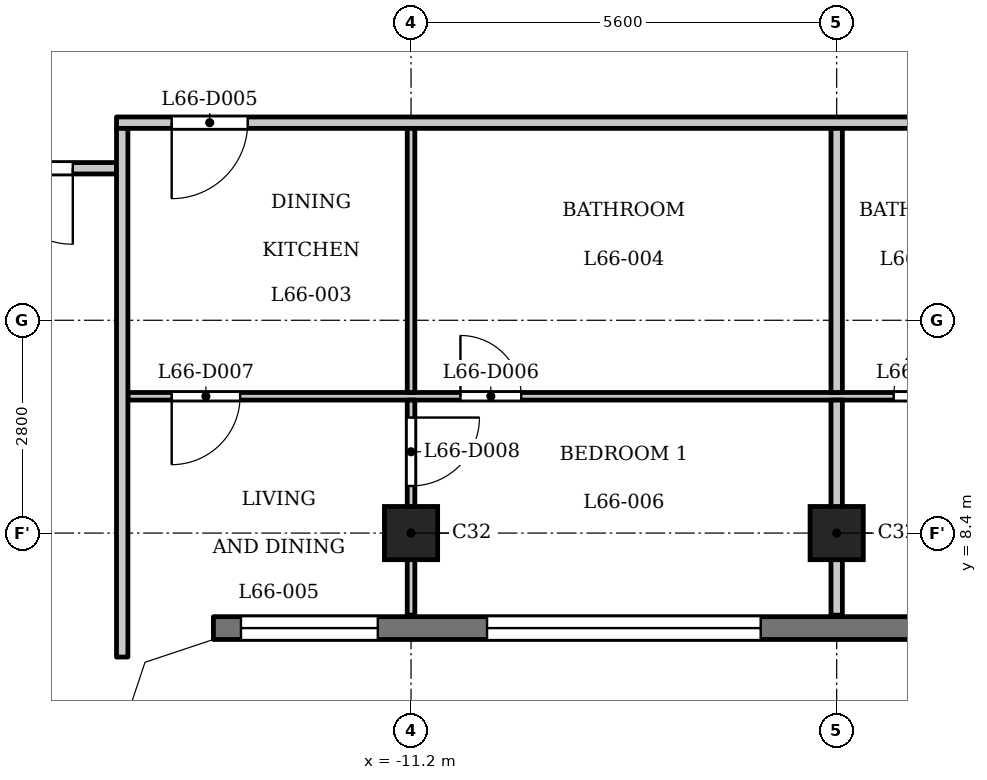
"""IFC4 building model, lengths in metres.
Left out: names, types, materials, properties, quantities, classifications, styles, units other than length and angle.
Written with IfcOpenShell. Run it as: python <this file> out.ifc"""

import sys

from ifc_helpers import new_model, si_unit, direction, frame, frame_2d, origin, origin_2d, place, context, subcontext, project, spatial, polyline, rectangle, outline, extrude, element, fill, save


model = new_model("IFC4")
c1 = context("Model", 3, precision=1e-05, world=origin(), true_north=direction((0.0, 1.0)))
c2 = subcontext(c1, "Body", "Model", "MODEL_VIEW")
j1 = project(units=[si_unit("LENGTHUNIT", "METRE"), si_unit("PLANEANGLEUNIT", "RADIAN")], contexts=[c1])
p1 = place(None, origin())
s1 = spatial("IfcSite", under=j1, at=p1, CompositionType="ELEMENT")
p2 = place(p1, origin())
s2 = spatial("IfcBuilding", under=s1, at=p2, CompositionType="ELEMENT")
p3 = place(p2, frame((0.0, 0.0, 255.7)))
s3 = spatial("IfcBuildingStorey", under=s2, at=p3, CompositionType="ELEMENT", Elevation=255.7)
for number, where, z_axis, x_axis in (
    (1, (-11.2, 8.4, 0.0), (0.0, 0.0, 1.0), (1.0, 0.0, 0.0)),
    (2, (-5.6, 8.4, 0.0), (0.0, 0.0, 1.0), (1.0, 0.0, 0.0)),
):
    element("IfcColumn", number, at=place(p3, frame(where, z_axis=z_axis, x_axis=x_axis)), inside=s3, PredefinedType="COLUMN", context=c2, shape_type="SweptSolid", body=[
        extrude(rectangle(XDim=0.7, YDim=0.7, at=origin_2d()), origin(), (0.0, 0.0, 1.0), 3.5),
    ])
p4 = place(p3, frame((-13.8, 7.15, 0.0), z_axis=(0.0, 0.0, 1.0), x_axis=(1.0, 0.0, 0.0)))
e3 = element("IfcWall", 3, at=p4, inside=s3, PredefinedType="SOLIDWALL", context=c2, shape_type="SweptSolid", body=[
    extrude(rectangle(XDim=27.6, YDim=0.3, at=frame_2d((13.8, 0.0))), origin(), (0.0, 0.0, 1.0), 3.2),
])
p5 = place(p4, frame((0.363, 0.0, 0.9)))
e4 = element("IfcOpeningElement", 4, at=p5, cuts=e3, PredefinedType="OPENING", context=c2, shape_type="SweptSolid", body=[
    extrude(rectangle(XDim=1.8, YDim=1.25, at=frame_2d((0.9, 0.625))), frame((0.0, 0.16, 0.0), z_axis=(0.0, -1.0, 0.0), x_axis=(1.0, 0.0, 0.0)), (0.0, 0.0, 1.0), 0.32),
])
p6 = place(p4, frame((3.6, 0.0, 1.2)))
e5 = element("IfcOpeningElement", 5, at=p6, cuts=e3, PredefinedType="OPENING", context=c2, shape_type="SweptSolid", body=[
    extrude(rectangle(XDim=3.6, YDim=0.95, at=frame_2d((1.8, 0.475))), frame((0.0, 0.16, 0.0), z_axis=(0.0, -1.0, 0.0), x_axis=(1.0, 0.0, 0.0)), (0.0, 0.0, 1.0), 0.32),
])
p7 = place(p4, frame((9.2, 0.0, 1.2)))
e6 = element("IfcOpeningElement", 6, at=p7, cuts=e3, PredefinedType="OPENING", context=c2, shape_type="SweptSolid", body=[
    extrude(rectangle(XDim=3.6, YDim=0.95, at=frame_2d((1.8, 0.475))), frame((0.0, 0.16, 0.0), z_axis=(0.0, -1.0, 0.0), x_axis=(1.0, 0.0, 0.0)), (0.0, 0.0, 1.0), 0.32),
])
p8 = place(p4, frame((14.2, 0.0, 0.9)))
e7 = element("IfcOpeningElement", 7, at=p8, cuts=e3, PredefinedType="OPENING", context=c2, shape_type="SweptSolid", body=[
    extrude(rectangle(XDim=1.8, YDim=1.25, at=frame_2d((0.9, 0.625))), frame((0.0, 0.16, 0.0), z_axis=(0.0, -1.0, 0.0), x_axis=(1.0, 0.0, 0.0)), (0.0, 0.0, 1.0), 0.32),
])
p9 = place(p4, frame((17.0, 0.0, 0.9)))
e8 = element("IfcOpeningElement", 8, at=p9, cuts=e3, PredefinedType="OPENING", context=c2, shape_type="SweptSolid", body=[
    extrude(rectangle(XDim=1.8, YDim=1.25, at=frame_2d((0.9, 0.625))), frame((0.0, 0.16, 0.0), z_axis=(0.0, -1.0, 0.0), x_axis=(1.0, 0.0, 0.0)), (0.0, 0.0, 1.0), 0.32),
])
p10 = place(p4, frame((20.4, 0.0, 1.2)))
e9 = element("IfcOpeningElement", 9, at=p10, cuts=e3, PredefinedType="OPENING", context=c2, shape_type="SweptSolid", body=[
    extrude(rectangle(XDim=3.6, YDim=0.95, at=frame_2d((1.8, 0.475))), frame((0.0, 0.16, 0.0), z_axis=(0.0, -1.0, 0.0), x_axis=(1.0, 0.0, 0.0)), (0.0, 0.0, 1.0), 0.32),
])
p11 = place(p4, frame((25.438, 0.0, 0.9)))
e10 = element("IfcOpeningElement", 10, at=p11, cuts=e3, PredefinedType="OPENING", context=c2, shape_type="SweptSolid", body=[
    extrude(rectangle(XDim=1.8, YDim=1.25, at=frame_2d((0.9, 0.625))), frame((0.0, 0.16, 0.0), z_axis=(0.0, -1.0, 0.0), x_axis=(1.0, 0.0, 0.0)), (0.0, 0.0, 1.0), 0.32),
])
p12 = place(p3, frame((-14.925, 10.2, 0.0), z_axis=(0.0, 0.0, 1.0), x_axis=(1.0, 0.0, 0.0)))
e11 = element("IfcWall", 11, at=p12, inside=s3, PredefinedType="PARTITIONING", context=c2, shape_type="SweptSolid", body=[
    extrude(rectangle(XDim=29.85, YDim=0.1, at=frame_2d((14.925, 0.0))), origin(), (0.0, 0.0, 1.0), 3.2),
])
p13 = place(p12, frame((4.375, 0.0, 0.0)))
e12 = element("IfcOpeningElement", 12, at=p13, cuts=e11, PredefinedType="OPENING", context=c2, shape_type="SweptSolid", body=[
    extrude(rectangle(XDim=0.8, YDim=2.1, at=frame_2d((0.4, 1.05))), frame((0.0, 0.06, 0.0), z_axis=(0.0, -1.0, 0.0), x_axis=(1.0, 0.0, 0.0)), (0.0, 0.0, 1.0), 0.12),
])
p14 = place(p12, frame((0.576, 0.0, 0.0)))
e13 = element("IfcOpeningElement", 13, at=p14, cuts=e11, PredefinedType="OPENING", context=c2, shape_type="SweptSolid", body=[
    extrude(rectangle(XDim=0.9, YDim=2.1, at=frame_2d((0.45, 1.05))), frame((0.0, 0.06, 0.0), z_axis=(0.0, -1.0, 0.0), x_axis=(1.0, 0.0, 0.0)), (0.0, 0.0, 1.0), 0.12),
])
p15 = place(p12, frame((10.075, 0.0, 0.0)))
e14 = element("IfcOpeningElement", 14, at=p15, cuts=e11, PredefinedType="OPENING", context=c2, shape_type="SweptSolid", body=[
    extrude(rectangle(XDim=0.8, YDim=2.1, at=frame_2d((0.4, 1.05))), frame((0.0, 0.06, 0.0), z_axis=(0.0, -1.0, 0.0), x_axis=(1.0, 0.0, 0.0)), (0.0, 0.0, 1.0), 0.12),
])
p16 = place(p12, frame((12.675, 0.0, 0.0)))
e15 = element("IfcOpeningElement", 15, at=p16, cuts=e11, PredefinedType="OPENING", context=c2, shape_type="SweptSolid", body=[
    extrude(rectangle(XDim=0.9, YDim=2.1, at=frame_2d((0.45, 1.05))), frame((0.0, 0.06, 0.0), z_axis=(0.0, -1.0, 0.0), x_axis=(1.0, 0.0, 0.0)), (0.0, 0.0, 1.0), 0.12),
])
p17 = place(p12, frame((16.075, 0.0, 0.0)))
e16 = element("IfcOpeningElement", 16, at=p17, cuts=e11, PredefinedType="OPENING", context=c2, shape_type="SweptSolid", body=[
    extrude(rectangle(XDim=0.9, YDim=2.1, at=frame_2d((0.45, 1.05))), frame((0.0, 0.06, 0.0), z_axis=(0.0, -1.0, 0.0), x_axis=(1.0, 0.0, 0.0)), (0.0, 0.0, 1.0), 0.12),
])
p18 = place(p12, frame((18.925, 0.0, 0.0)))
e17 = element("IfcOpeningElement", 17, at=p18, cuts=e11, PredefinedType="OPENING", context=c2, shape_type="SweptSolid", body=[
    extrude(rectangle(XDim=0.9, YDim=2.1, at=frame_2d((0.45, 1.05))), frame((0.0, 0.06, 0.0), z_axis=(0.0, -1.0, 0.0), x_axis=(1.0, 0.0, 0.0)), (0.0, 0.0, 1.0), 0.12),
])
p19 = place(p12, frame((21.175, 0.0, 0.0)))
e18 = element("IfcOpeningElement", 18, at=p19, cuts=e11, PredefinedType="OPENING", context=c2, shape_type="SweptSolid", body=[
    extrude(rectangle(XDim=0.8, YDim=2.1, at=frame_2d((0.4, 1.05))), frame((0.0, 0.06, 0.0), z_axis=(0.0, -1.0, 0.0), x_axis=(1.0, 0.0, 0.0)), (0.0, 0.0, 1.0), 0.12),
])
p20 = place(p12, frame((26.775, 0.0, 0.0)))
e19 = element("IfcOpeningElement", 19, at=p20, cuts=e11, PredefinedType="OPENING", context=c2, shape_type="SweptSolid", body=[
    extrude(rectangle(XDim=0.9, YDim=2.1, at=frame_2d((0.45, 1.05))), frame((0.0, 0.06, 0.0), z_axis=(0.0, -1.0, 0.0), x_axis=(1.0, 0.0, 0.0)), (0.0, 0.0, 1.0), 0.12),
])
p21 = place(p3, frame((-17.4, 13.2, 0.0), z_axis=(0.0, 0.0, 1.0), x_axis=(1.0, 0.0, 0.0)))
e20 = element("IfcWall", 20, at=p21, inside=s3, PredefinedType="PARTITIONING", context=c2, shape_type="SweptSolid", body=[
    extrude(rectangle(XDim=2.325, YDim=0.15, at=frame_2d((1.163, 0.0))), origin(), (0.0, 0.0, 1.0), 3.2),
])
p22 = place(p21, frame((0.75, 0.0, 0.0)))
e21 = element("IfcOpeningElement", 21, at=p22, cuts=e20, PredefinedType="OPENING", context=c2, shape_type="SweptSolid", body=[
    extrude(rectangle(XDim=1.0, YDim=2.1, at=frame_2d((0.5, 1.05))), frame((0.0, 0.085, 0.0), z_axis=(0.0, -1.0, 0.0), x_axis=(1.0, 0.0, 0.0)), (0.0, 0.0, 1.0), 0.17),
])
p23 = place(p3, frame((-15.075, 13.8, 0.0), z_axis=(0.0, 0.0, 1.0), x_axis=(1.0, 0.0, 0.0)))
e22 = element("IfcWall", 22, at=p23, inside=s3, PredefinedType="PARTITIONING", context=c2, shape_type="SweptSolid", body=[
    extrude(rectangle(XDim=30.15, YDim=0.15, at=frame_2d((15.075, 0.0))), origin(), (0.0, 0.0, 1.0), 3.2),
])
p24 = place(p23, frame((0.726, 0.0, 0.0)))
e23 = element("IfcOpeningElement", 23, at=p24, cuts=e22, PredefinedType="OPENING", context=c2, shape_type="SweptSolid", body=[
    extrude(rectangle(XDim=1.0, YDim=2.1, at=frame_2d((0.5, 1.05))), frame((0.0, 0.085, 0.0), z_axis=(0.0, -1.0, 0.0), x_axis=(1.0, 0.0, 0.0)), (0.0, 0.0, 1.0), 0.17),
])
p25 = place(p23, frame((15.725, 0.0, 0.0)))
e24 = element("IfcOpeningElement", 24, at=p25, cuts=e22, PredefinedType="OPENING", context=c2, shape_type="SweptSolid", body=[
    extrude(rectangle(XDim=1.0, YDim=2.1, at=frame_2d((0.5, 1.05))), frame((0.0, 0.085, 0.0), z_axis=(0.0, -1.0, 0.0), x_axis=(1.0, 0.0, 0.0)), (0.0, 0.0, 1.0), 0.17),
])
p26 = place(p23, frame((26.925, 0.0, 0.0)))
e25 = element("IfcOpeningElement", 25, at=p26, cuts=e22, PredefinedType="OPENING", context=c2, shape_type="SweptSolid", body=[
    extrude(rectangle(XDim=1.0, YDim=2.1, at=frame_2d((0.5, 1.05))), frame((0.0, 0.085, 0.0), z_axis=(0.0, -1.0, 0.0), x_axis=(1.0, 0.0, 0.0)), (0.0, 0.0, 1.0), 0.17),
])
p27 = place(p3, frame((-15.0, 6.769, 0.0), z_axis=(0.0, 0.0, 1.0), x_axis=(0.0, 1.0, 0.0)))
e26 = element("IfcWall", 26, at=p27, inside=s3, PredefinedType="PARTITIONING", context=c2, shape_type="SweptSolid", body=[
    extrude(rectangle(XDim=6.956, YDim=0.15, at=frame_2d((3.478, 0.0))), origin(), (0.0, 0.0, 1.0), 3.2),
])
p28 = place(p3, frame((-11.2, 7.32, 0.0), z_axis=(0.0, 0.0, 1.0), x_axis=(0.0, 1.0, 0.0)))
e27 = element("IfcWall", 27, at=p28, inside=s3, PredefinedType="PARTITIONING", context=c2, shape_type="SweptSolid", body=[
    extrude(rectangle(XDim=2.83, YDim=0.1, at=frame_2d((1.415, 0.0))), origin(), (0.0, 0.0, 1.0), 3.2),
])
p29 = place(p28, frame((1.7, 0.0, 0.0)))
e28 = element("IfcOpeningElement", 28, at=p29, cuts=e27, PredefinedType="OPENING", context=c2, shape_type="SweptSolid", body=[
    extrude(rectangle(XDim=0.9, YDim=2.1, at=frame_2d((0.45, 1.05))), frame((0.0, 0.06, 0.0), z_axis=(0.0, -1.0, 0.0), x_axis=(1.0, 0.0, 0.0)), (0.0, 0.0, 1.0), 0.12),
])
p30 = place(p3, frame((-11.2, 10.25, 0.0), z_axis=(0.0, 0.0, 1.0), x_axis=(0.0, 1.0, 0.0)))
e29 = element("IfcWall", 29, at=p30, inside=s3, PredefinedType="PARTITIONING", context=c2, shape_type="SweptSolid", body=[
    extrude(rectangle(XDim=3.475, YDim=0.1, at=frame_2d((1.738, 0.0))), origin(), (0.0, 0.0, 1.0), 3.2),
])
p31 = place(p3, frame((-5.6, 7.32, 0.0), z_axis=(0.0, 0.0, 1.0), x_axis=(0.0, 1.0, 0.0)))
e30 = element("IfcWall", 30, at=p31, inside=s3, PredefinedType="PARTITIONING", context=c2, shape_type="SweptSolid", body=[
    extrude(rectangle(XDim=2.83, YDim=0.15, at=frame_2d((1.415, 0.0))), origin(), (0.0, 0.0, 1.0), 3.2),
])
p32 = place(p3, frame((-5.6, 10.25, 0.0), z_axis=(0.0, 0.0, 1.0), x_axis=(0.0, 1.0, 0.0)))
e31 = element("IfcWall", 31, at=p32, inside=s3, PredefinedType="PARTITIONING", context=c2, shape_type="SweptSolid", body=[
    extrude(rectangle(XDim=3.475, YDim=0.15, at=frame_2d((1.738, 0.0))), origin(), (0.0, 0.0, 1.0), 3.2),
])
p33 = place(p3, origin())
e32 = element("IfcWall", 32, at=p33, inside=s3, PredefinedType="SOLIDWALL", context=c2, shape_type="SweptSolid", body=[
    extrude(outline(polyline([(-13.849, 7.3), (-14.937, 6.937), (-15.3, 5.849), (-15.3, 5.8), (-15.0, 5.8), (-14.7, 6.7), (-13.8, 7.0), (-13.8, 7.3), (-13.849, 7.3)])), origin(), (0.0, 0.0, 1.0), 3.2),
])
p34 = place(p22, origin())
e33 = element("IfcDoor", 33, at=p34, inside=s3, OperationType="SINGLE_SWING_RIGHT", PredefinedType="DOOR", context=c2, shape_type="SweptSolid", body=[
    extrude(rectangle(XDim=1.0, YDim=2.1, at=frame_2d((0.5, 1.05))), frame((0.0, 0.025, 0.0), z_axis=(0.0, -1.0, 0.0), x_axis=(1.0, 0.0, 0.0)), (0.0, 0.0, 1.0), 0.05),
])
fill(e21, e33)
p35 = place(p24, origin())
e34 = element("IfcDoor", 34, at=p35, inside=s3, OperationType="SINGLE_SWING_LEFT", PredefinedType="DOOR", context=c2, shape_type="SweptSolid", body=[
    extrude(rectangle(XDim=1.0, YDim=2.1, at=frame_2d((0.5, 1.05))), frame((0.0, 0.025, 0.0), z_axis=(0.0, -1.0, 0.0), x_axis=(1.0, 0.0, 0.0)), (0.0, 0.0, 1.0), 0.05),
])
fill(e23, e34)
p36 = place(p13, origin())
e35 = element("IfcDoor", 35, at=p36, inside=s3, OperationType="SINGLE_SWING_RIGHT", PredefinedType="DOOR", context=c2, shape_type="SweptSolid", body=[
    extrude(rectangle(XDim=0.8, YDim=2.1, at=frame_2d((0.4, 1.05))), frame((0.0, 0.025, 0.0), z_axis=(0.0, -1.0, 0.0), x_axis=(1.0, 0.0, 0.0)), (0.0, 0.0, 1.0), 0.05),
])
fill(e12, e35)
p37 = place(p14, origin())
e36 = element("IfcDoor", 36, at=p37, inside=s3, OperationType="SINGLE_SWING_LEFT", PredefinedType="DOOR", context=c2, shape_type="SweptSolid", body=[
    extrude(rectangle(XDim=0.9, YDim=2.1, at=frame_2d((0.45, 1.05))), frame((0.0, 0.025, 0.0), z_axis=(0.0, -1.0, 0.0), x_axis=(1.0, 0.0, 0.0)), (0.0, 0.0, 1.0), 0.05),
])
fill(e13, e36)
p38 = place(p29, origin())
e37 = element("IfcDoor", 37, at=p38, inside=s3, OperationType="SINGLE_SWING_RIGHT", PredefinedType="DOOR", context=c2, shape_type="SweptSolid", body=[
    extrude(rectangle(XDim=0.9, YDim=2.1, at=frame_2d((0.45, 1.05))), frame((0.0, 0.025, 0.0), z_axis=(0.0, -1.0, 0.0), x_axis=(1.0, 0.0, 0.0)), (0.0, 0.0, 1.0), 0.05),
])
fill(e28, e37)
p39 = place(p15, origin())
e38 = element("IfcDoor", 38, at=p39, inside=s3, OperationType="SINGLE_SWING_LEFT", PredefinedType="DOOR", context=c2, shape_type="SweptSolid", body=[
    extrude(rectangle(XDim=0.8, YDim=2.1, at=frame_2d((0.4, 1.05))), frame((0.0, 0.025, 0.0), z_axis=(0.0, -1.0, 0.0), x_axis=(1.0, 0.0, 0.0)), (0.0, 0.0, 1.0), 0.05),
])
fill(e14, e38)
p40 = place(p5, origin())
e39 = element("IfcWindow", 39, at=p40, inside=s3, PartitioningType="SINGLE_PANEL", PredefinedType="WINDOW", context=c2, shape_type="SweptSolid", body=[
    extrude(rectangle(XDim=1.8, YDim=1.25, at=frame_2d((0.9, 0.625))), frame((0.0, 0.03, 0.0), z_axis=(0.0, -1.0, 0.0), x_axis=(1.0, 0.0, 0.0)), (0.0, 0.0, 1.0), 0.06),
])
fill(e4, e39)
p41 = place(p6, origin())
e40 = element("IfcWindow", 40, at=p41, inside=s3, PartitioningType="SINGLE_PANEL", PredefinedType="WINDOW", context=c2, shape_type="SweptSolid", body=[
    extrude(rectangle(XDim=3.6, YDim=0.95, at=frame_2d((1.8, 0.475))), frame((0.0, 0.03, 0.0), z_axis=(0.0, -1.0, 0.0), x_axis=(1.0, 0.0, 0.0)), (0.0, 0.0, 1.0), 0.06),
])
fill(e5, e40)
save(model, sys.argv[1])
